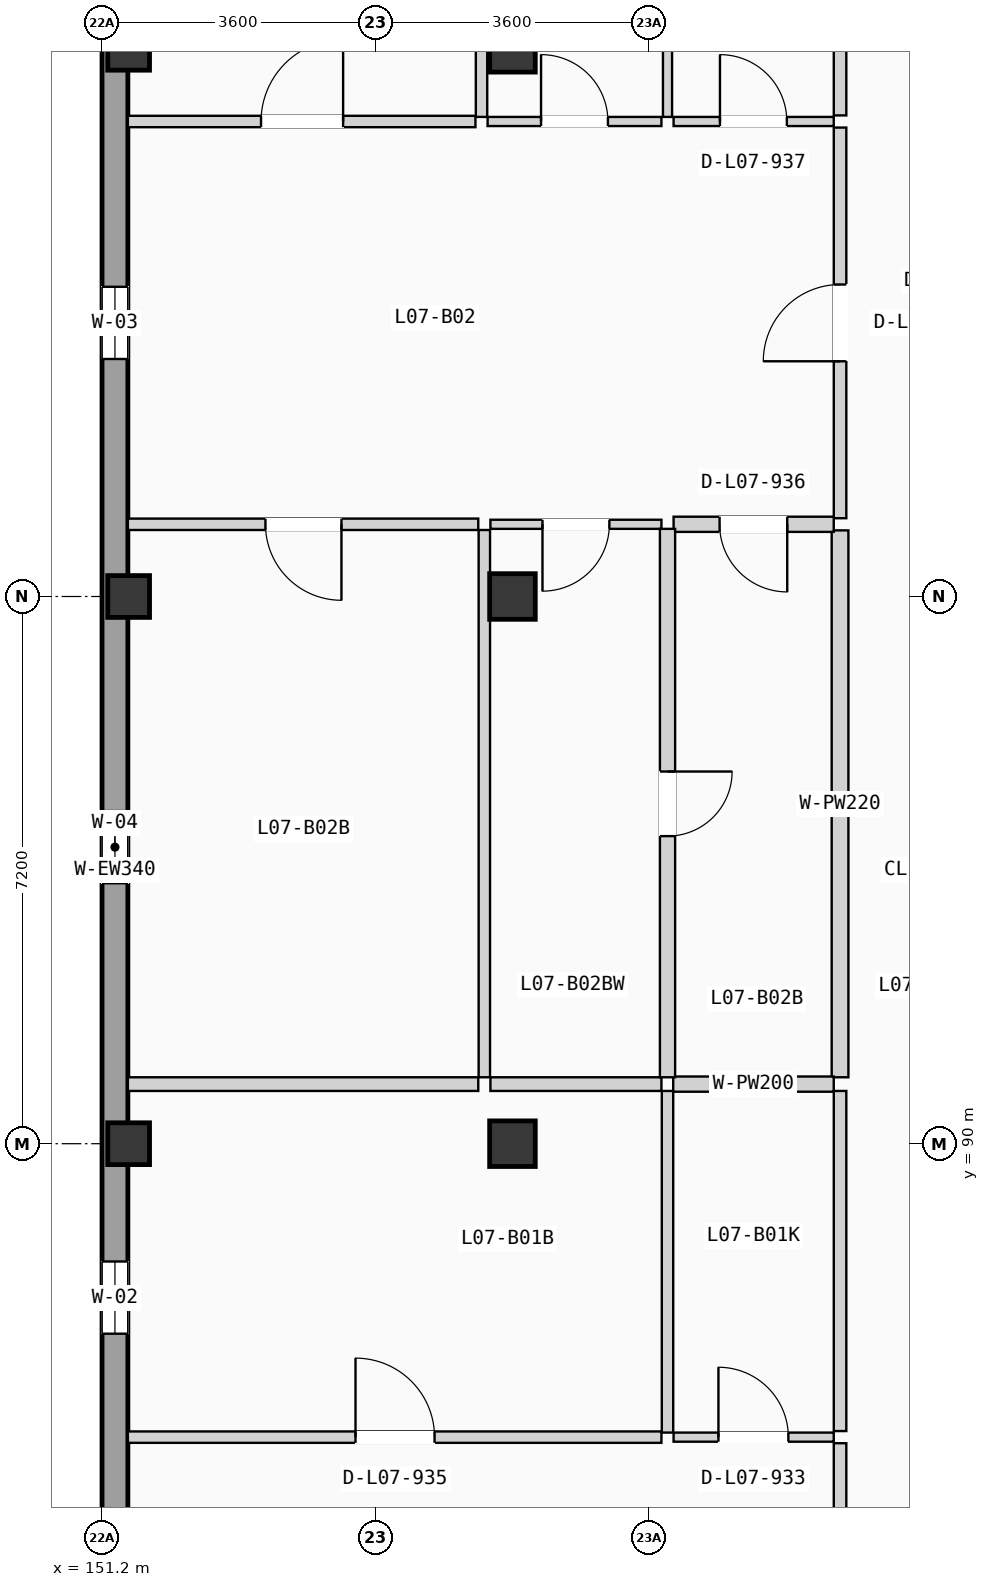
"""IFC4 building model, lengths in metres.
Left out: names, types, materials, properties, quantities, classifications, styles, units other than length and angle.
Written with IfcOpenShell. Run it as: python <this file> out.ifc"""

import sys

from ifc_helpers import new_model, si_unit, direction, frame, frame_2d, origin, origin_2d, place, context, subcontext, project, spatial, rectangle, extrude, element, fill, save


model = new_model("IFC4")
c1 = context("Model", 3, precision=1e-05, world=origin(), true_north=direction((0.0, 1.0)))
c2 = subcontext(c1, "Body", "Model", "MODEL_VIEW")
j1 = project(units=[si_unit("LENGTHUNIT", "METRE"), si_unit("PLANEANGLEUNIT", "RADIAN")], contexts=[c1])
p1 = place(None, origin())
s1 = spatial("IfcSite", under=j1, at=p1, CompositionType="ELEMENT")
p2 = place(p1, origin())
s2 = spatial("IfcBuilding", under=s1, at=p2, CompositionType="ELEMENT")
p3 = place(p2, frame((0.0, 0.0, 24.675)))
s3 = spatial("IfcBuildingStorey", under=s2, at=p3, CompositionType="ELEMENT", Elevation=24.675)
for number, where, z_axis, x_axis in (
    (1, (151.55, 90.0, 0.0), (0.0, 0.0, 1.0), (1.0, 0.0, 0.0)),
    (2, (151.55, 97.2, 0.0), (0.0, 0.0, 1.0), (1.0, 0.0, 0.0)),
    (3, (151.55, 104.4, 0.0), (0.0, 0.0, 1.0), (1.0, 0.0, 0.0)),
):
    element("IfcColumn", number, at=place(p3, frame(where, z_axis=z_axis, x_axis=x_axis)), inside=s3, PredefinedType="COLUMN", context=c2, shape_type="SweptSolid", body=[
        extrude(rectangle(XDim=0.55, YDim=0.55, at=origin_2d()), origin(), (0.0, 0.0, 1.0), 3.15),
    ])
for number, where, z_axis, x_axis in (
    (4, (156.6, 90.0, 0.0), (0.0, 0.0, 1.0), (1.0, 0.0, 0.0)),
    (5, (156.6, 97.2, 0.0), (0.0, 0.0, 1.0), (1.0, 0.0, 0.0)),
    (6, (156.6, 104.4, 0.0), (0.0, 0.0, 1.0), (1.0, 0.0, 0.0)),
):
    element("IfcColumn", number, at=place(p3, frame(where, z_axis=z_axis, x_axis=x_axis)), inside=s3, PredefinedType="COLUMN", context=c2, shape_type="SweptSolid", body=[
        extrude(rectangle(XDim=0.6, YDim=0.6, at=origin_2d()), origin(), (0.0, 0.0, 1.0), 3.15),
    ])
p4 = place(p3, frame((151.37, 68.74, 0.0), z_axis=(0.0, 0.0, 1.0), x_axis=(0.0, 1.0, 0.0)))
e7 = element("IfcWall", 7, at=p4, inside=s3, PredefinedType="SOLIDWALL", context=c2, shape_type="SweptSolid", body=[
    extrude(rectangle(XDim=49.72, YDim=0.34, at=frame_2d((24.86, 0.0))), origin(), (0.0, 0.0, 1.0), 2.9),
])
p5 = place(p4, frame((15.35, 0.0, 0.85)))
e8 = element("IfcOpeningElement", 8, at=p5, cuts=e7, PredefinedType="OPENING", context=c2, shape_type="SweptSolid", body=[
    extrude(rectangle(XDim=0.95, YDim=1.2, at=frame_2d((0.475, 0.6))), frame((0.0, 0.18, 0.0), z_axis=(0.0, -1.0, 0.0), x_axis=(1.0, 0.0, 0.0)), (0.0, 0.0, 1.0), 0.36),
])
p6 = place(p4, frame((9.023, 0.0, 0.9)))
e9 = element("IfcOpeningElement", 9, at=p6, cuts=e7, PredefinedType="OPENING", context=c2, shape_type="SweptSolid", body=[
    extrude(rectangle(XDim=0.95, YDim=1.2, at=frame_2d((0.475, 0.6))), frame((0.0, 0.18, 0.0), z_axis=(0.0, -1.0, 0.0), x_axis=(1.0, 0.0, 0.0)), (0.0, 0.0, 1.0), 0.36),
])
p7 = place(p4, frame((18.76, 0.0, 0.865)))
e10 = element("IfcOpeningElement", 10, at=p7, cuts=e7, PredefinedType="OPENING", context=c2, shape_type="SweptSolid", body=[
    extrude(rectangle(XDim=0.95, YDim=1.35, at=frame_2d((0.475, 0.675))), frame((0.0, 0.18, 0.0), z_axis=(0.0, -1.0, 0.0), x_axis=(1.0, 0.0, 0.0)), (0.0, 0.0, 1.0), 0.36),
])
p8 = place(p4, frame((31.585, 0.0, 0.715)))
e11 = element("IfcOpeningElement", 11, at=p8, cuts=e7, PredefinedType="OPENING", context=c2, shape_type="SweptSolid", body=[
    extrude(rectangle(XDim=0.95, YDim=1.5, at=frame_2d((0.475, 0.75))), frame((0.0, 0.18, 0.0), z_axis=(0.0, -1.0, 0.0), x_axis=(1.0, 0.0, 0.0)), (0.0, 0.0, 1.0), 0.36),
])
p9 = place(p4, frame((24.687, 0.0, 0.565)))
e12 = element("IfcOpeningElement", 12, at=p9, cuts=e7, PredefinedType="OPENING", context=c2, shape_type="SweptSolid", body=[
    extrude(rectangle(XDim=0.95, YDim=1.65, at=frame_2d((0.475, 0.825))), frame((0.0, 0.18, 0.0), z_axis=(0.0, -1.0, 0.0), x_axis=(1.0, 0.0, 0.0)), (0.0, 0.0, 1.0), 0.36),
])
p10 = place(p4, frame((38.72, 0.0, 0.85)))
e13 = element("IfcOpeningElement", 13, at=p10, cuts=e7, PredefinedType="OPENING", context=c2, shape_type="SweptSolid", body=[
    extrude(rectangle(XDim=0.95, YDim=1.2, at=frame_2d((0.475, 0.6))), frame((0.0, 0.18, 0.0), z_axis=(0.0, -1.0, 0.0), x_axis=(1.0, 0.0, 0.0)), (0.0, 0.0, 1.0), 0.36),
])
p11 = place(p3, frame((160.91, 80.635, 0.0), z_axis=(0.0, 0.0, 1.0), x_axis=(0.0, 1.0, 0.0)))
e14 = element("IfcWall", 14, at=p11, inside=s3, PredefinedType="PARTITIONING", context=c2, shape_type="SweptSolid", body=[
    extrude(rectangle(XDim=5.424, YDim=0.165, at=frame_2d((2.712, 0.0))), origin(), (0.0, 0.0, 1.0), 2.87),
])
p12 = place(p11, frame((2.207, 0.0, 0.0)))
e15 = element("IfcOpeningElement", 15, at=p12, cuts=e14, PredefinedType="OPENING", context=c2, shape_type="SweptSolid", body=[
    extrude(rectangle(XDim=1.01, YDim=2.11, at=frame_2d((0.505, 1.055))), frame((0.0, 0.093, 0.0), z_axis=(0.0, -1.0, 0.0), x_axis=(1.0, 0.0, 0.0)), (0.0, 0.0, 1.0), 0.185),
])
p13 = place(p3, frame((160.91, 86.219, 0.0), z_axis=(0.0, 0.0, 1.0), x_axis=(0.0, 1.0, 0.0)))
e16 = element("IfcWall", 16, at=p13, inside=s3, PredefinedType="PARTITIONING", context=c2, shape_type="SweptSolid", body=[
    extrude(rectangle(XDim=4.475, YDim=0.165, at=frame_2d((2.238, 0.0))), origin(), (0.0, 0.0, 1.0), 2.87),
])
p14 = place(p3, frame((160.91, 98.23, 0.0), z_axis=(0.0, 0.0, 1.0), x_axis=(0.0, 1.0, 0.0)))
e17 = element("IfcWall", 17, at=p14, inside=s3, PredefinedType="PARTITIONING", context=c2, shape_type="SweptSolid", body=[
    extrude(rectangle(XDim=5.14, YDim=0.165, at=frame_2d((2.57, 0.0))), origin(), (0.0, 0.0, 1.0), 2.87),
])
p15 = place(p14, frame((2.065, 0.0, 0.0)))
e18 = element("IfcOpeningElement", 18, at=p15, cuts=e17, PredefinedType="OPENING", context=c2, shape_type="SweptSolid", body=[
    extrude(rectangle(XDim=1.01, YDim=2.11, at=frame_2d((0.505, 1.055))), frame((0.0, 0.093, 0.0), z_axis=(0.0, -1.0, 0.0), x_axis=(1.0, 0.0, 0.0)), (0.0, 0.0, 1.0), 0.185),
])
p16 = place(p3, frame((160.91, 90.874, 0.0), z_axis=(0.0, 0.0, 1.0), x_axis=(0.0, 1.0, 0.0)))
e19 = element("IfcWall", 19, at=p16, inside=s3, PredefinedType="PLUMBINGWALL", context=c2, shape_type="SweptSolid", body=[
    extrude(rectangle(XDim=7.196, YDim=0.22, at=frame_2d((3.598, 0.0))), origin(), (0.0, 0.0, 1.0), 2.87),
])
p17 = place(p3, frame((160.91, 103.53, 0.0), z_axis=(0.0, 0.0, 1.0), x_axis=(0.0, 1.0, 0.0)))
e20 = element("IfcWall", 20, at=p17, inside=s3, PredefinedType="PARTITIONING", context=c2, shape_type="SweptSolid", body=[
    extrude(rectangle(XDim=7.67, YDim=0.165, at=frame_2d((3.835, 0.0))), origin(), (0.0, 0.0, 1.0), 2.87),
])
p18 = place(p3, frame((158.72, 86.139, 0.0), z_axis=(0.0, 0.0, 1.0), x_axis=(1.0, 0.0, 0.0)))
e21 = element("IfcWall", 21, at=p18, inside=s3, PredefinedType="PARTITIONING", context=c2, shape_type="SweptSolid", body=[
    extrude(rectangle(XDim=2.107, YDim=0.12, at=frame_2d((1.053, 0.0))), origin(), (0.0, 0.0, 1.0), 2.87),
])
p19 = place(p18, frame((0.59, 0.0, 0.0)))
e22 = element("IfcOpeningElement", 22, at=p19, cuts=e21, PredefinedType="OPENING", context=c2, shape_type="SweptSolid", body=[
    extrude(rectangle(XDim=0.92, YDim=2.02, at=frame_2d((0.46, 1.01))), frame((0.0, 0.07, 0.0), z_axis=(0.0, -1.0, 0.0), x_axis=(1.0, 0.0, 0.0)), (0.0, 0.0, 1.0), 0.14),
])
p20 = place(p3, frame((151.54, 86.139, 0.0), z_axis=(0.0, 0.0, 1.0), x_axis=(1.0, 0.0, 0.0)))
e23 = element("IfcWall", 23, at=p20, inside=s3, PredefinedType="PARTITIONING", context=c2, shape_type="SweptSolid", body=[
    extrude(rectangle(XDim=7.02, YDim=0.15, at=frame_2d((3.51, 0.0))), origin(), (0.0, 0.0, 1.0), 2.87),
])
p21 = place(p20, frame((2.995, 0.0, 0.0)))
e24 = element("IfcOpeningElement", 24, at=p21, cuts=e23, PredefinedType="OPENING", context=c2, shape_type="SweptSolid", body=[
    extrude(rectangle(XDim=1.04, YDim=2.08, at=frame_2d((0.52, 1.04))), frame((0.0, 0.085, 0.0), z_axis=(0.0, -1.0, 0.0), x_axis=(1.0, 0.0, 0.0)), (0.0, 0.0, 1.0), 0.17),
])
p22 = place(p3, frame((158.64, 86.199, 0.0), z_axis=(0.0, 0.0, 1.0), x_axis=(0.0, 1.0, 0.0)))
e25 = element("IfcWall", 25, at=p22, inside=s3, PredefinedType="PARTITIONING", context=c2, shape_type="SweptSolid", body=[
    extrude(rectangle(XDim=4.495, YDim=0.15, at=frame_2d((2.248, 0.0))), origin(), (0.0, 0.0, 1.0), 2.87),
])
p23 = place(p3, frame((158.715, 90.784, 0.0), z_axis=(0.0, 0.0, 1.0), x_axis=(1.0, 0.0, 0.0)))
e26 = element("IfcWall", 26, at=p23, inside=s3, PredefinedType="PLUMBINGWALL", context=c2, shape_type="SweptSolid", body=[
    extrude(rectangle(XDim=2.112, YDim=0.2, at=frame_2d((1.056, 0.0))), origin(), (0.0, 0.0, 1.0), 2.87),
])
p24 = place(p3, frame((151.54, 90.784, 0.0), z_axis=(0.0, 0.0, 1.0), x_axis=(1.0, 0.0, 0.0)))
e27 = element("IfcWall", 27, at=p24, inside=s3, PredefinedType="PARTITIONING", context=c2, shape_type="SweptSolid", body=[
    extrude(rectangle(XDim=4.61, YDim=0.18, at=frame_2d((2.305, 0.0))), origin(), (0.0, 0.0, 1.0), 2.87),
])
p25 = place(p3, frame((156.31, 90.784, 0.0), z_axis=(0.0, 0.0, 1.0), x_axis=(1.0, 0.0, 0.0)))
e28 = element("IfcWall", 28, at=p25, inside=s3, PredefinedType="PARTITIONING", context=c2, shape_type="SweptSolid", body=[
    extrude(rectangle(XDim=2.25, YDim=0.18, at=frame_2d((1.125, 0.0))), origin(), (0.0, 0.0, 1.0), 2.87),
])
p26 = place(p3, frame((158.72, 98.15, 0.0), z_axis=(0.0, 0.0, 1.0), x_axis=(1.0, 0.0, 0.0)))
e29 = element("IfcWall", 29, at=p26, inside=s3, PredefinedType="PLUMBINGWALL", context=c2, shape_type="SweptSolid", body=[
    extrude(rectangle(XDim=2.107, YDim=0.2, at=frame_2d((1.053, 0.0))), origin(), (0.0, 0.0, 1.0), 2.87),
])
p27 = place(p26, frame((0.605, 0.0, 0.0)))
e30 = element("IfcOpeningElement", 30, at=p27, cuts=e29, PredefinedType="OPENING", context=c2, shape_type="SweptSolid", body=[
    extrude(rectangle(XDim=0.89, YDim=2.03, at=frame_2d((0.445, 1.015))), frame((0.0, 0.11, 0.0), z_axis=(0.0, -1.0, 0.0), x_axis=(1.0, 0.0, 0.0)), (0.0, 0.0, 1.0), 0.22),
])
p28 = place(p3, frame((158.72, 103.45, 0.0), z_axis=(0.0, 0.0, 1.0), x_axis=(1.0, 0.0, 0.0)))
e31 = element("IfcWall", 31, at=p28, inside=s3, PredefinedType="PARTITIONING", context=c2, shape_type="SweptSolid", body=[
    extrude(rectangle(XDim=2.107, YDim=0.12, at=frame_2d((1.053, 0.0))), origin(), (0.0, 0.0, 1.0), 2.87),
])
p29 = place(p28, frame((0.61, 0.0, 0.0)))
e32 = element("IfcOpeningElement", 32, at=p29, cuts=e31, PredefinedType="OPENING", context=c2, shape_type="SweptSolid", body=[
    extrude(rectangle(XDim=0.88, YDim=2.02, at=frame_2d((0.44, 1.01))), frame((0.0, 0.07, 0.0), z_axis=(0.0, -1.0, 0.0), x_axis=(1.0, 0.0, 0.0)), (0.0, 0.0, 1.0), 0.14),
])
p30 = place(p3, frame((151.54, 98.15, 0.0), z_axis=(0.0, 0.0, 1.0), x_axis=(1.0, 0.0, 0.0)))
e33 = element("IfcWall", 33, at=p30, inside=s3, PredefinedType="PARTITIONING", context=c2, shape_type="SweptSolid", body=[
    extrude(rectangle(XDim=4.61, YDim=0.15, at=frame_2d((2.305, 0.0))), origin(), (0.0, 0.0, 1.0), 2.87),
])
p31 = place(p30, frame((1.81, 0.0, 0.0)))
e34 = element("IfcOpeningElement", 34, at=p31, cuts=e33, PredefinedType="OPENING", context=c2, shape_type="SweptSolid", body=[
    extrude(rectangle(XDim=1.0, YDim=2.06, at=frame_2d((0.5, 1.03))), frame((0.0, 0.085, 0.0), z_axis=(0.0, -1.0, 0.0), x_axis=(1.0, 0.0, 0.0)), (0.0, 0.0, 1.0), 0.17),
])
p32 = place(p3, frame((156.31, 98.15, 0.0), z_axis=(0.0, 0.0, 1.0), x_axis=(1.0, 0.0, 0.0)))
e35 = element("IfcWall", 35, at=p32, inside=s3, PredefinedType="PARTITIONING", context=c2, shape_type="SweptSolid", body=[
    extrude(rectangle(XDim=2.25, YDim=0.12, at=frame_2d((1.125, 0.0))), origin(), (0.0, 0.0, 1.0), 2.87),
])
p33 = place(p32, frame((0.685, 0.0, 0.0)))
e36 = element("IfcOpeningElement", 36, at=p33, cuts=e35, PredefinedType="OPENING", context=c2, shape_type="SweptSolid", body=[
    extrude(rectangle(XDim=0.88, YDim=2.02, at=frame_2d((0.44, 1.01))), frame((0.0, 0.07, 0.0), z_axis=(0.0, -1.0, 0.0), x_axis=(1.0, 0.0, 0.0)), (0.0, 0.0, 1.0), 0.14),
])
p34 = place(p3, frame((151.54, 103.45, 0.0), z_axis=(0.0, 0.0, 1.0), x_axis=(1.0, 0.0, 0.0)))
e37 = element("IfcWall", 37, at=p34, inside=s3, PredefinedType="PARTITIONING", context=c2, shape_type="SweptSolid", body=[
    extrude(rectangle(XDim=4.573, YDim=0.15, at=frame_2d((2.287, 0.0))), origin(), (0.0, 0.0, 1.0), 2.87),
])
p35 = place(p34, frame((1.752, 0.0, 0.0)))
e38 = element("IfcOpeningElement", 38, at=p35, cuts=e37, PredefinedType="OPENING", context=c2, shape_type="SweptSolid", body=[
    extrude(rectangle(XDim=1.08, YDim=2.1, at=frame_2d((0.54, 1.05))), frame((0.0, 0.085, 0.0), z_axis=(0.0, -1.0, 0.0), x_axis=(1.0, 0.0, 0.0)), (0.0, 0.0, 1.0), 0.17),
])
p36 = place(p3, frame((156.273, 103.45, 0.0), z_axis=(0.0, 0.0, 1.0), x_axis=(1.0, 0.0, 0.0)))
e39 = element("IfcWall", 39, at=p36, inside=s3, PredefinedType="PARTITIONING", context=c2, shape_type="SweptSolid", body=[
    extrude(rectangle(XDim=2.287, YDim=0.12, at=frame_2d((1.144, 0.0))), origin(), (0.0, 0.0, 1.0), 2.87),
])
p37 = place(p36, frame((0.703, 0.0, 0.0)))
e40 = element("IfcOpeningElement", 40, at=p37, cuts=e39, PredefinedType="OPENING", context=c2, shape_type="SweptSolid", body=[
    extrude(rectangle(XDim=0.88, YDim=2.02, at=frame_2d((0.44, 1.01))), frame((0.0, 0.07, 0.0), z_axis=(0.0, -1.0, 0.0), x_axis=(1.0, 0.0, 0.0)), (0.0, 0.0, 1.0), 0.14),
])
p38 = place(p3, frame((158.64, 90.874, 0.0), z_axis=(0.0, 0.0, 1.0), x_axis=(0.0, 1.0, 0.0)))
e41 = element("IfcWall", 41, at=p38, inside=s3, PredefinedType="PLUMBINGWALL", context=c2, shape_type="SweptSolid", body=[
    extrude(rectangle(XDim=7.216, YDim=0.2, at=frame_2d((3.608, 0.0))), origin(), (0.0, 0.0, 1.0), 2.87),
])
p39 = place(p38, frame((3.173, 0.0, 0.0)))
e42 = element("IfcOpeningElement", 42, at=p39, cuts=e41, PredefinedType="OPENING", context=c2, shape_type="SweptSolid", body=[
    extrude(rectangle(XDim=0.85, YDim=2.01, at=frame_2d((0.425, 1.005))), frame((0.0, 0.11, 0.0), z_axis=(0.0, -1.0, 0.0), x_axis=(1.0, 0.0, 0.0)), (0.0, 0.0, 1.0), 0.22),
])
p40 = place(p3, frame((158.64, 103.51, 0.0), z_axis=(0.0, 0.0, 1.0), x_axis=(0.0, 1.0, 0.0)))
e43 = element("IfcWall", 43, at=p40, inside=s3, PredefinedType="PARTITIONING", context=c2, shape_type="SweptSolid", body=[
    extrude(rectangle(XDim=7.69, YDim=0.12, at=frame_2d((3.845, 0.0))), origin(), (0.0, 0.0, 1.0), 2.87),
])
p41 = place(p3, frame((156.23, 90.874, 0.0), z_axis=(0.0, 0.0, 1.0), x_axis=(0.0, 1.0, 0.0)))
e44 = element("IfcWall", 44, at=p41, inside=s3, PredefinedType="PARTITIONING", context=c2, shape_type="SweptSolid", body=[
    extrude(rectangle(XDim=7.201, YDim=0.15, at=frame_2d((3.601, 0.0))), origin(), (0.0, 0.0, 1.0), 2.87),
])
p42 = place(p3, frame((156.193, 103.51, 0.0), z_axis=(0.0, 0.0, 1.0), x_axis=(0.0, 1.0, 0.0)))
e45 = element("IfcWall", 45, at=p42, inside=s3, PredefinedType="PARTITIONING", context=c2, shape_type="SweptSolid", body=[
    extrude(rectangle(XDim=7.69, YDim=0.15, at=frame_2d((3.845, 0.0))), origin(), (0.0, 0.0, 1.0), 2.87),
])
p43 = place(p7, origin())
e46 = element("IfcWindow", 46, at=p43, inside=s3, PartitioningType="SINGLE_PANEL", PredefinedType="WINDOW", context=c2, shape_type="SweptSolid", body=[
    extrude(rectangle(XDim=0.95, YDim=1.35, at=frame_2d((0.475, 0.675))), frame((0.0, 0.03, 0.0), z_axis=(0.0, -1.0, 0.0), x_axis=(1.0, 0.0, 0.0)), (0.0, 0.0, 1.0), 0.06),
])
fill(e10, e46)
p44 = place(p8, origin())
e47 = element("IfcWindow", 47, at=p44, inside=s3, PartitioningType="SINGLE_PANEL", PredefinedType="WINDOW", context=c2, shape_type="SweptSolid", body=[
    extrude(rectangle(XDim=0.95, YDim=1.5, at=frame_2d((0.475, 0.75))), frame((0.0, 0.03, 0.0), z_axis=(0.0, -1.0, 0.0), x_axis=(1.0, 0.0, 0.0)), (0.0, 0.0, 1.0), 0.06),
])
fill(e11, e47)
p45 = place(p9, origin())
e48 = element("IfcWindow", 48, at=p45, inside=s3, PartitioningType="SINGLE_PANEL", PredefinedType="WINDOW", context=c2, shape_type="SweptSolid", body=[
    extrude(rectangle(XDim=0.95, YDim=1.65, at=frame_2d((0.475, 0.825))), frame((0.0, 0.03, 0.0), z_axis=(0.0, -1.0, 0.0), x_axis=(1.0, 0.0, 0.0)), (0.0, 0.0, 1.0), 0.06),
])
fill(e12, e48)
p46 = place(p15, origin())
e49 = element("IfcDoor", 49, at=p46, inside=s3, OperationType="SINGLE_SWING_LEFT", PredefinedType="DOOR", context=c2, shape_type="SweptSolid", body=[
    extrude(rectangle(XDim=1.01, YDim=2.11, at=frame_2d((0.505, 1.055))), frame((0.0, 0.025, 0.0), z_axis=(0.0, -1.0, 0.0), x_axis=(1.0, 0.0, 0.0)), (0.0, 0.0, 1.0), 0.05),
])
fill(e18, e49)
p47 = place(p19, origin())
e50 = element("IfcDoor", 50, at=p47, inside=s3, OperationType="SINGLE_SWING_LEFT", PredefinedType="DOOR", context=c2, shape_type="SweptSolid", body=[
    extrude(rectangle(XDim=0.92, YDim=2.02, at=frame_2d((0.46, 1.01))), frame((0.0, 0.025, 0.0), z_axis=(0.0, -1.0, 0.0), x_axis=(1.0, 0.0, 0.0)), (0.0, 0.0, 1.0), 0.05),
])
fill(e22, e50)
p48 = place(p21, origin())
e51 = element("IfcDoor", 51, at=p48, inside=s3, OperationType="SINGLE_SWING_LEFT", PredefinedType="DOOR", context=c2, shape_type="SweptSolid", body=[
    extrude(rectangle(XDim=1.04, YDim=2.08, at=frame_2d((0.52, 1.04))), frame((0.0, 0.025, 0.0), z_axis=(0.0, -1.0, 0.0), x_axis=(1.0, 0.0, 0.0)), (0.0, 0.0, 1.0), 0.05),
])
fill(e24, e51)
p49 = place(p27, frame((0.89, 0.0, 0.0), z_axis=(0.0, 0.0, 1.0), x_axis=(-1.0, 0.0, 0.0)))
e52 = element("IfcDoor", 52, at=p49, inside=s3, OperationType="SINGLE_SWING_RIGHT", PredefinedType="DOOR", context=c2, shape_type="SweptSolid", body=[
    extrude(rectangle(XDim=0.89, YDim=2.03, at=frame_2d((0.445, 1.015))), frame((0.0, 0.025, 0.0), z_axis=(0.0, -1.0, 0.0), x_axis=(1.0, 0.0, 0.0)), (0.0, 0.0, 1.0), 0.05),
])
fill(e30, e52)
p50 = place(p29, origin())
e53 = element("IfcDoor", 53, at=p50, inside=s3, OperationType="SINGLE_SWING_LEFT", PredefinedType="DOOR", context=c2, shape_type="SweptSolid", body=[
    extrude(rectangle(XDim=0.88, YDim=2.02, at=frame_2d((0.44, 1.01))), frame((0.0, 0.025, 0.0), z_axis=(0.0, -1.0, 0.0), x_axis=(1.0, 0.0, 0.0)), (0.0, 0.0, 1.0), 0.05),
])
fill(e32, e53)
p51 = place(p31, frame((1.0, 0.0, 0.0), z_axis=(0.0, 0.0, 1.0), x_axis=(-1.0, 0.0, 0.0)))
e54 = element("IfcDoor", 54, at=p51, inside=s3, OperationType="SINGLE_SWING_RIGHT", PredefinedType="DOOR", context=c2, shape_type="SweptSolid", body=[
    extrude(rectangle(XDim=1.0, YDim=2.06, at=frame_2d((0.5, 1.03))), frame((0.0, 0.025, 0.0), z_axis=(0.0, -1.0, 0.0), x_axis=(1.0, 0.0, 0.0)), (0.0, 0.0, 1.0), 0.05),
])
fill(e34, e54)
p52 = place(p33, frame((0.88, 0.0, 0.0), z_axis=(0.0, 0.0, 1.0), x_axis=(-1.0, 0.0, 0.0)))
e55 = element("IfcDoor", 55, at=p52, inside=s3, OperationType="SINGLE_SWING_LEFT", PredefinedType="DOOR", context=c2, shape_type="SweptSolid", body=[
    extrude(rectangle(XDim=0.88, YDim=2.02, at=frame_2d((0.44, 1.01))), frame((0.0, 0.025, 0.0), z_axis=(0.0, -1.0, 0.0), x_axis=(1.0, 0.0, 0.0)), (0.0, 0.0, 1.0), 0.05),
])
fill(e36, e55)
p53 = place(p35, origin())
e56 = element("IfcDoor", 56, at=p53, inside=s3, OperationType="SINGLE_SWING_RIGHT", PredefinedType="DOOR", context=c2, shape_type="SweptSolid", body=[
    extrude(rectangle(XDim=1.08, YDim=2.1, at=frame_2d((0.54, 1.05))), frame((0.0, 0.025, 0.0), z_axis=(0.0, -1.0, 0.0), x_axis=(1.0, 0.0, 0.0)), (0.0, 0.0, 1.0), 0.05),
])
fill(e38, e56)
p54 = place(p37, origin())
e57 = element("IfcDoor", 57, at=p54, inside=s3, OperationType="SINGLE_SWING_LEFT", PredefinedType="DOOR", context=c2, shape_type="SweptSolid", body=[
    extrude(rectangle(XDim=0.88, YDim=2.02, at=frame_2d((0.44, 1.01))), frame((0.0, 0.025, 0.0), z_axis=(0.0, -1.0, 0.0), x_axis=(1.0, 0.0, 0.0)), (0.0, 0.0, 1.0), 0.05),
])
fill(e40, e57)
p55 = place(p39, frame((0.85, 0.0, 0.0), z_axis=(0.0, 0.0, 1.0), x_axis=(-1.0, 0.0, 0.0)))
e58 = element("IfcDoor", 58, at=p55, inside=s3, OperationType="SINGLE_SWING_RIGHT", PredefinedType="DOOR", context=c2, shape_type="SweptSolid", body=[
    extrude(rectangle(XDim=0.85, YDim=2.01, at=frame_2d((0.425, 1.005))), frame((0.0, 0.025, 0.0), z_axis=(0.0, -1.0, 0.0), x_axis=(1.0, 0.0, 0.0)), (0.0, 0.0, 1.0), 0.05),
])
fill(e42, e58)
save(model, sys.argv[1])
